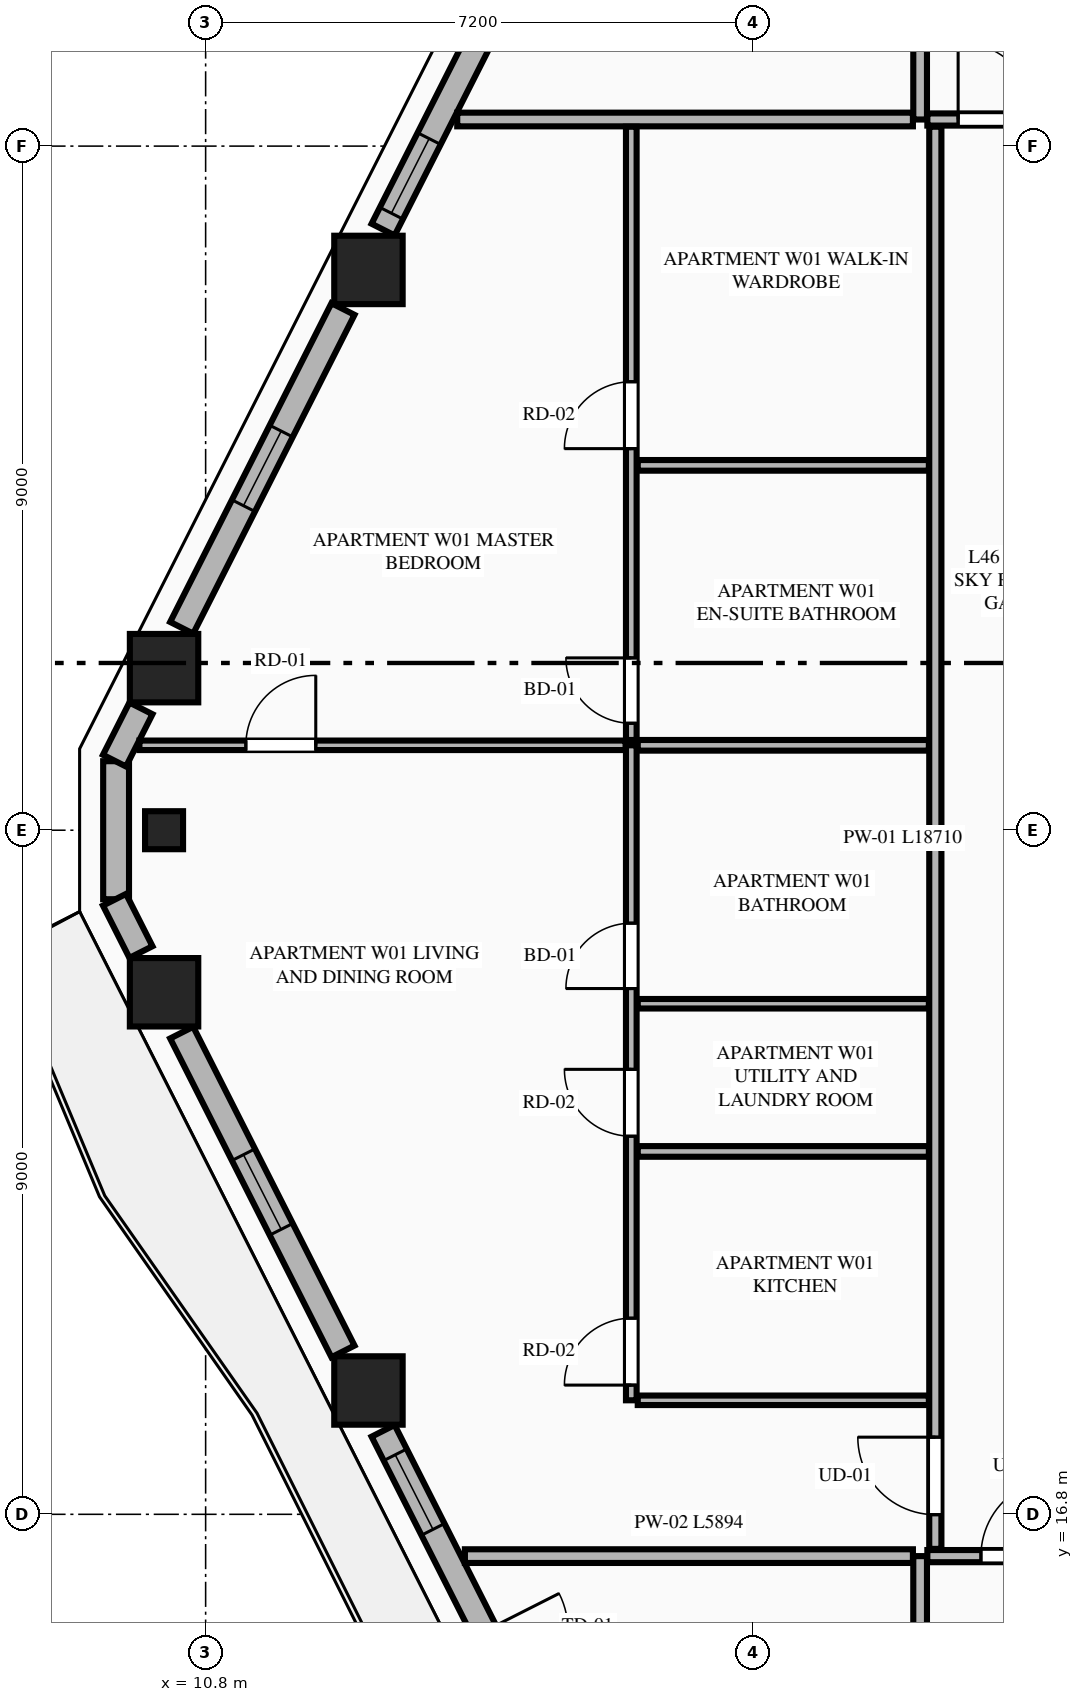
"""IFC4 building model, lengths in metres.
Left out: names, types, materials, properties, quantities, classifications, styles, units other than length and angle.
Written with IfcOpenShell. Run it as: python <this file> out.ifc"""

import sys

from ifc_helpers import new_model, si_unit, direction, frame, frame_2d, origin, origin_2d, place, context, subcontext, project, spatial, rectangle, extrude, element, fill, save


model = new_model("IFC4")
c1 = context("Model", 3, precision=1e-05, world=origin(), true_north=direction((0.0, 1.0)))
c2 = subcontext(c1, "Body", "Model", "MODEL_VIEW")
j1 = project(units=[si_unit("LENGTHUNIT", "METRE"), si_unit("PLANEANGLEUNIT", "RADIAN")], contexts=[c1])
p1 = place(None, origin())
s1 = spatial("IfcSite", under=j1, at=p1, CompositionType="ELEMENT")
p2 = place(p1, origin())
s2 = spatial("IfcBuilding", under=s1, at=p2, CompositionType="ELEMENT")
p3 = place(p2, frame((0.0, 0.0, 175.45)))
s3 = spatial("IfcBuildingStorey", under=s2, at=p3, CompositionType="ELEMENT", Elevation=175.45)
for number, where, z_axis, x_axis in (
    (1, (12.942, 33.171, 0.0), (0.0, 0.0, 1.0), (1.0, 0.0, 0.0)),
    (2, (10.253, 27.932, 0.0), (0.0, 0.0, 1.0), (1.0, 0.0, 0.0)),
    (3, (10.253, 23.668, 0.0), (0.0, 0.0, 1.0), (1.0, 0.0, 0.0)),
    (4, (12.942, 18.429, 0.0), (0.0, 0.0, 1.0), (1.0, 0.0, 0.0)),
):
    element("IfcColumn", number, at=place(p3, frame(where, z_axis=z_axis, x_axis=x_axis)), inside=s3, PredefinedType="COLUMN", context=c2, shape_type="SweptSolid", body=[
        extrude(rectangle(XDim=0.9, YDim=0.9, at=origin_2d()), origin(), (0.0, 0.0, 1.0), 3.55),
    ])
p4 = place(p3, frame((10.253, 25.8, 0.0), z_axis=(0.0, 0.0, 1.0), x_axis=(0.0, -1.0, 0.0)))
e5 = element("IfcColumn", 5, at=p4, inside=s3, PredefinedType="PILASTER", context=c2, shape_type="SweptSolid", body=[
    extrude(rectangle(XDim=0.5, YDim=0.35, at=origin_2d()), origin(), (0.0, 0.0, 1.0), 3.55),
])
p5 = place(p3, frame((9.622, 26.708, 0.0), z_axis=(0.0, 0.0, 1.0), x_axis=(0.0, -1.0, 0.0)))
e6 = element("IfcWall", 6, at=p5, inside=s3, PredefinedType="STANDARD", context=c2, shape_type="SweptSolid", body=[
    extrude(rectangle(XDim=1.816, YDim=0.34, at=frame_2d((0.908, 0.0))), origin(), (0.0, 0.0, 1.0), 3.35),
])
p6 = place(p3, frame((15.352, 38.083, 0.0), z_axis=(0.0, 0.0, 1.0), x_axis=(-0.451524246964, -0.89225884944, 0.0)))
e7 = element("IfcWall", 7, at=p6, inside=s3, PredefinedType="STANDARD", context=c2, shape_type="SweptSolid", body=[
    extrude(rectangle(XDim=4.91, YDim=0.34, at=frame_2d((2.455, 0.0))), origin(), (0.0, 0.0, 1.0), 2.883),
])
p7 = place(p6, frame((0.963, 0.0, 0.75)))
e8 = element("IfcOpeningElement", 8, at=p7, cuts=e7, PredefinedType="OPENING", context=c2, shape_type="SweptSolid", body=[
    extrude(rectangle(XDim=1.1, YDim=1.983, at=frame_2d((0.55, 0.991))), frame((0.0, 0.18, 0.0), z_axis=(0.0, -1.0, 0.0), x_axis=(1.0, 0.0, 0.0)), (0.0, 0.0, 1.0), 0.36),
])
p8 = place(p6, frame((3.569, 0.0, 0.75)))
e9 = element("IfcOpeningElement", 9, at=p8, cuts=e7, PredefinedType="OPENING", context=c2, shape_type="SweptSolid", body=[
    extrude(rectangle(XDim=1.1, YDim=1.983, at=frame_2d((0.55, 0.991))), frame((0.0, 0.18, 0.0), z_axis=(0.0, -1.0, 0.0), x_axis=(1.0, 0.0, 0.0)), (0.0, 0.0, 1.0), 0.36),
])
p9 = place(p3, frame((12.607, 32.657, 0.0), z_axis=(0.0, 0.0, 1.0), x_axis=(-0.451426298588, -0.892308409096, 0.0)))
e10 = element("IfcWall", 10, at=p9, inside=s3, PredefinedType="STANDARD", context=c2, shape_type="SweptSolid", body=[
    extrude(rectangle(XDim=4.7, YDim=0.34, at=frame_2d((2.35, 0.0))), origin(), (0.0, 0.0, 1.0), 2.883),
])
p10 = place(p9, frame((1.8, 0.0, 0.75)))
e11 = element("IfcOpeningElement", 11, at=p10, cuts=e10, PredefinedType="OPENING", context=c2, shape_type="SweptSolid", body=[
    extrude(rectangle(XDim=1.1, YDim=1.983, at=frame_2d((0.55, 0.991))), frame((0.0, 0.18, 0.0), z_axis=(0.0, -1.0, 0.0), x_axis=(1.0, 0.0, 0.0)), (0.0, 0.0, 1.0), 0.36),
])
for number, where, z_axis, x_axis in (
    (12, (9.949, 27.403, 0.0), (0.0, 0.0, 1.0), (-0.451, -0.892, 0.0)),
    (13, (9.601, 24.885, 0.0), (0.0, 0.0, 1.0), (0.451, -0.892, 0.0)),
):
    element("IfcWall", number, at=place(p3, frame(where, z_axis=z_axis, x_axis=x_axis)), inside=s3, PredefinedType="STANDARD", context=c2, shape_type="SweptSolid", body=[
        extrude(rectangle(XDim=0.771, YDim=0.34, at=frame_2d((0.385, 0.0))), origin(), (0.0, 0.0, 1.0), 3.35),
    ])
p11 = place(p3, frame((10.485, 23.137, 0.0), z_axis=(0.0, 0.0, 1.0), x_axis=(0.451447222193, -0.892297823361, 0.0)))
e14 = element("IfcWall", 14, at=p11, inside=s3, PredefinedType="STANDARD", context=c2, shape_type="SweptSolid", body=[
    extrude(rectangle(XDim=4.7, YDim=0.34, at=frame_2d((2.35, 0.0))), origin(), (0.0, 0.0, 1.0), 2.883),
])
p12 = place(p11, frame((1.8, 0.0, 0.75)))
e15 = element("IfcOpeningElement", 15, at=p12, cuts=e14, PredefinedType="OPENING", context=c2, shape_type="SweptSolid", body=[
    extrude(rectangle(XDim=1.1, YDim=1.983, at=frame_2d((0.55, 0.991))), frame((0.0, 0.18, 0.0), z_axis=(0.0, -1.0, 0.0), x_axis=(1.0, 0.0, 0.0)), (0.0, 0.0, 1.0), 0.36),
])
p13 = place(p3, frame((13.135, 17.898, 0.0), z_axis=(0.0, 0.0, 1.0), x_axis=(0.451544279509, -0.892248711763, 0.0)))
e16 = element("IfcWall", 16, at=p13, inside=s3, PredefinedType="STANDARD", context=c2, shape_type="SweptSolid", body=[
    extrude(rectangle(XDim=4.91, YDim=0.34, at=frame_2d((2.455, 0.0))), origin(), (0.0, 0.0, 1.0), 2.883),
])
p14 = place(p13, frame((2.954, 0.0, 0.0)))
e17 = element("IfcOpeningElement", 17, at=p14, cuts=e16, PredefinedType="OPENING", context=c2, shape_type="SweptSolid", body=[
    extrude(rectangle(XDim=1.1, YDim=2.25, at=frame_2d((0.55, 1.125))), frame((0.0, 0.18, 0.0), z_axis=(0.0, -1.0, 0.0), x_axis=(1.0, 0.0, 0.0)), (0.0, 0.0, 1.0), 0.36),
])
p15 = place(p13, frame((0.353, 0.0, 0.75)))
e18 = element("IfcOpeningElement", 18, at=p15, cuts=e16, PredefinedType="OPENING", context=c2, shape_type="SweptSolid", body=[
    extrude(rectangle(XDim=1.1, YDim=1.983, at=frame_2d((0.55, 0.991))), frame((0.0, 0.18, 0.0), z_axis=(0.0, -1.0, 0.0), x_axis=(1.0, 0.0, 0.0)), (0.0, 0.0, 1.0), 0.36),
])
p16 = place(p3, frame((20.2, 5.968, 0.0), z_axis=(0.0, 0.0, 1.0), x_axis=(0.0, 1.0, 0.0)))
e19 = element("IfcWall", 19, at=p16, inside=s3, PredefinedType="PARTITIONING", context=c2, shape_type="SweptSolid", body=[
    extrude(rectangle(XDim=10.282, YDim=0.18, at=frame_2d((5.141, 0.0))), origin(), (0.0, 0.0, 1.0), 3.35),
])
p17 = place(p3, frame((20.295, 16.25, 0.0), z_axis=(0.0, 0.0, 1.0), x_axis=(1.0, 0.0, 0.0)))
e20 = element("IfcWall", 20, at=p17, inside=s3, PredefinedType="PARTITIONING", context=c2, shape_type="SweptSolid", body=[
    extrude(rectangle(XDim=8.467, YDim=0.16, at=frame_2d((4.233, 0.0))), origin(), (0.0, 0.0, 1.0), 3.35),
])
p18 = place(p17, frame((0.705, 0.0, 0.0)))
e21 = element("IfcOpeningElement", 21, at=p18, cuts=e20, PredefinedType="OPENING", context=c2, shape_type="SweptSolid", body=[
    extrude(rectangle(XDim=1.02, YDim=2.25, at=frame_2d((0.51, 1.125))), frame((0.0, 0.09, 0.0), z_axis=(0.0, -1.0, 0.0), x_axis=(1.0, 0.0, 0.0)), (0.0, 0.0, 1.0), 0.18),
])
p19 = place(p3, frame((20.2, 35.15, 0.0), z_axis=(0.0, 0.0, 1.0), x_axis=(0.0, 1.0, 0.0)))
e22 = element("IfcWall", 22, at=p19, inside=s3, PredefinedType="PARTITIONING", context=c2, shape_type="SweptSolid", body=[
    extrude(rectangle(XDim=10.482, YDim=0.18, at=frame_2d((5.241, 0.0))), origin(), (0.0, 0.0, 1.0), 3.35),
])
p20 = place(p3, frame((20.295, 35.15, 0.0), z_axis=(0.0, 0.0, 1.0), x_axis=(1.0, 0.0, 0.0)))
e23 = element("IfcWall", 23, at=p20, inside=s3, PredefinedType="PARTITIONING", context=c2, shape_type="SweptSolid", body=[
    extrude(rectangle(XDim=15.553, YDim=0.16, at=frame_2d((7.776, 0.0))), origin(), (0.0, 0.0, 1.0), 3.35),
])
p21 = place(p20, frame((0.405, 0.0, 0.0)))
e24 = element("IfcOpeningElement", 24, at=p21, cuts=e23, PredefinedType="OPENING", context=c2, shape_type="SweptSolid", body=[
    extrude(rectangle(XDim=1.02, YDim=2.25, at=frame_2d((0.51, 1.125))), frame((0.0, 0.09, 0.0), z_axis=(0.0, -1.0, 0.0), x_axis=(1.0, 0.0, 0.0)), (0.0, 0.0, 1.0), 0.18),
])
p22 = place(p3, frame((14.211, 16.25, 0.0), z_axis=(0.0, 0.0, 1.0), x_axis=(1.0, 0.0, 0.0)))
e25 = element("IfcWall", 25, at=p22, inside=s3, PredefinedType="PARTITIONING", context=c2, shape_type="SweptSolid", body=[
    extrude(rectangle(XDim=5.894, YDim=0.18, at=frame_2d((2.947, 0.0))), origin(), (0.0, 0.0, 1.0), 3.35),
])
p23 = place(p3, frame((14.11, 35.15, 0.0), z_axis=(0.0, 0.0, 1.0), x_axis=(1.0, 0.0, 0.0)))
e26 = element("IfcWall", 26, at=p23, inside=s3, PredefinedType="PARTITIONING", context=c2, shape_type="SweptSolid", body=[
    extrude(rectangle(XDim=5.995, YDim=0.18, at=frame_2d((2.998, 0.0))), origin(), (0.0, 0.0, 1.0), 3.35),
])
p24 = place(p3, frame((20.4, 16.345, 0.0), z_axis=(0.0, 0.0, 1.0), x_axis=(0.0, 1.0, 0.0)))
e27 = element("IfcWall", 27, at=p24, inside=s3, PredefinedType="PARTITIONING", context=c2, shape_type="SweptSolid", body=[
    extrude(rectangle(XDim=18.71, YDim=0.16, at=frame_2d((9.355, 0.0))), origin(), (0.0, 0.0, 1.0), 3.35),
])
p25 = place(p24, frame((0.45, 0.0, 0.0)))
e28 = element("IfcOpeningElement", 28, at=p25, cuts=e27, PredefinedType="OPENING", context=c2, shape_type="SweptSolid", body=[
    extrude(rectangle(XDim=1.02, YDim=2.25, at=frame_2d((0.51, 1.125))), frame((0.0, 0.09, 0.0), z_axis=(0.0, -1.0, 0.0), x_axis=(1.0, 0.0, 0.0)), (0.0, 0.0, 1.0), 0.18),
])
p26 = place(p3, frame((16.485, 18.3, 0.0), z_axis=(0.0, 0.0, 1.0), x_axis=(1.0, 0.0, 0.0)))
e29 = element("IfcWall", 29, at=p26, inside=s3, PredefinedType="PARTITIONING", context=c2, shape_type="SweptSolid", body=[
    extrude(rectangle(XDim=3.83, YDim=0.125, at=frame_2d((1.915, 0.0))), origin(), (0.0, 0.0, 1.0), 2.807),
])
p27 = place(p3, frame((16.4, 18.3, 0.0), z_axis=(0.0, 0.0, 1.0), x_axis=(0.0, 1.0, 0.0)))
e30 = element("IfcWall", 30, at=p27, inside=s3, PredefinedType="PLUMBINGWALL", context=c2, shape_type="SweptSolid", body=[
    extrude(rectangle(XDim=8.617, YDim=0.14, at=frame_2d((4.309, 0.0))), origin(), (0.0, 0.0, 1.0), 3.35),
])
p28 = place(p27, frame((0.2, 0.0, 0.0)))
e31 = element("IfcOpeningElement", 31, at=p28, cuts=e30, PredefinedType="OPENING", context=c2, shape_type="SweptSolid", body=[
    extrude(rectangle(XDim=0.88, YDim=2.15, at=frame_2d((0.44, 1.075))), frame((0.0, 0.08, 0.0), z_axis=(0.0, -1.0, 0.0), x_axis=(1.0, 0.0, 0.0)), (0.0, 0.0, 1.0), 0.16),
])
p29 = place(p27, frame((3.474, 0.0, 0.0)))
e32 = element("IfcOpeningElement", 32, at=p29, cuts=e30, PredefinedType="OPENING", context=c2, shape_type="SweptSolid", body=[
    extrude(rectangle(XDim=0.88, YDim=2.15, at=frame_2d((0.44, 1.075))), frame((0.0, 0.08, 0.0), z_axis=(0.0, -1.0, 0.0), x_axis=(1.0, 0.0, 0.0)), (0.0, 0.0, 1.0), 0.16),
])
p30 = place(p27, frame((5.417, 0.0, 0.0)))
e33 = element("IfcOpeningElement", 33, at=p30, cuts=e30, PredefinedType="OPENING", context=c2, shape_type="SweptSolid", body=[
    extrude(rectangle(XDim=0.86, YDim=2.1, at=frame_2d((0.43, 1.05))), frame((0.0, 0.08, 0.0), z_axis=(0.0, -1.0, 0.0), x_axis=(1.0, 0.0, 0.0)), (0.0, 0.0, 1.0), 0.16),
])
p31 = place(p3, frame((16.4, 26.987, 0.0), z_axis=(0.0, 0.0, 1.0), x_axis=(0.0, 1.0, 0.0)))
e34 = element("IfcWall", 34, at=p31, inside=s3, PredefinedType="PLUMBINGWALL", context=c2, shape_type="SweptSolid", body=[
    extrude(rectangle(XDim=8.068, YDim=0.14, at=frame_2d((4.034, 0.0))), origin(), (0.0, 0.0, 1.0), 3.35),
])
p32 = place(p31, frame((0.22, 0.0, 0.0)))
e35 = element("IfcOpeningElement", 35, at=p32, cuts=e34, PredefinedType="OPENING", context=c2, shape_type="SweptSolid", body=[
    extrude(rectangle(XDim=0.86, YDim=2.1, at=frame_2d((0.43, 1.05))), frame((0.0, 0.08, 0.0), z_axis=(0.0, -1.0, 0.0), x_axis=(1.0, 0.0, 0.0)), (0.0, 0.0, 1.0), 0.16),
])
p33 = place(p31, frame((3.833, 0.0, 0.0)))
e36 = element("IfcOpeningElement", 36, at=p33, cuts=e34, PredefinedType="OPENING", context=c2, shape_type="SweptSolid", body=[
    extrude(rectangle(XDim=0.88, YDim=2.15, at=frame_2d((0.44, 1.075))), frame((0.0, 0.08, 0.0), z_axis=(0.0, -1.0, 0.0), x_axis=(1.0, 0.0, 0.0)), (0.0, 0.0, 1.0), 0.16),
])
p34 = place(p3, frame((16.485, 26.917, 0.0), z_axis=(0.0, 0.0, 1.0), x_axis=(1.0, 0.0, 0.0)))
e37 = element("IfcWall", 37, at=p34, inside=s3, PredefinedType="PLUMBINGWALL", context=c2, shape_type="SweptSolid", body=[
    extrude(rectangle(XDim=3.83, YDim=0.14, at=frame_2d((1.915, 0.0))), origin(), (0.0, 0.0, 1.0), 3.35),
])
p35 = place(p3, frame((9.929, 26.917, 0.0), z_axis=(0.0, 0.0, 1.0), x_axis=(1.0, 0.0, 0.0)))
e38 = element("IfcWall", 38, at=p35, inside=s3, PredefinedType="PARTITIONING", context=c2, shape_type="SweptSolid", body=[
    extrude(rectangle(XDim=6.396, YDim=0.125, at=frame_2d((3.198, 0.0))), origin(), (0.0, 0.0, 1.0), 3.35),
])
p36 = place(p35, frame((1.4, 0.0, 0.0)))
e39 = element("IfcOpeningElement", 39, at=p36, cuts=e38, PredefinedType="OPENING", context=c2, shape_type="SweptSolid", body=[
    extrude(rectangle(XDim=0.92, YDim=2.15, at=frame_2d((0.46, 1.075))), frame((0.0, 0.073, 0.0), z_axis=(0.0, -1.0, 0.0), x_axis=(1.0, 0.0, 0.0)), (0.0, 0.0, 1.0), 0.145),
])
p37 = place(p3, frame((16.485, 21.574, 0.0), z_axis=(0.0, 0.0, 1.0), x_axis=(1.0, 0.0, 0.0)))
e40 = element("IfcWall", 40, at=p37, inside=s3, PredefinedType="PLUMBINGWALL", context=c2, shape_type="SweptSolid", body=[
    extrude(rectangle(XDim=3.83, YDim=0.14, at=frame_2d((1.915, 0.0))), origin(), (0.0, 0.0, 1.0), 3.35),
])
p38 = place(p3, frame((16.485, 23.517, 0.0), z_axis=(0.0, 0.0, 1.0), x_axis=(1.0, 0.0, 0.0)))
e41 = element("IfcWall", 41, at=p38, inside=s3, PredefinedType="PARTITIONING", context=c2, shape_type="SweptSolid", body=[
    extrude(rectangle(XDim=3.83, YDim=0.125, at=frame_2d((1.915, 0.0))), origin(), (0.0, 0.0, 1.0), 3.35),
])
p39 = place(p3, frame((16.485, 30.6, 0.0), z_axis=(0.0, 0.0, 1.0), x_axis=(1.0, 0.0, 0.0)))
e42 = element("IfcWall", 42, at=p39, inside=s3, PredefinedType="PLUMBINGWALL", context=c2, shape_type="SweptSolid", body=[
    extrude(rectangle(XDim=3.83, YDim=0.14, at=frame_2d((1.915, 0.0))), origin(), (0.0, 0.0, 1.0), 3.35),
])
p40 = place(p10, origin())
e43 = element("IfcWindow", 43, at=p40, inside=s3, PartitioningType="SINGLE_PANEL", PredefinedType="WINDOW", context=c2, shape_type="SweptSolid", body=[
    extrude(rectangle(XDim=1.1, YDim=1.983, at=frame_2d((0.55, 0.991))), frame((0.0, 0.03, 0.0), z_axis=(0.0, -1.0, 0.0), x_axis=(1.0, 0.0, 0.0)), (0.0, 0.0, 1.0), 0.06),
])
fill(e11, e43)
p41 = place(p12, origin())
e44 = element("IfcWindow", 44, at=p41, inside=s3, PartitioningType="SINGLE_PANEL", PredefinedType="WINDOW", context=c2, shape_type="SweptSolid", body=[
    extrude(rectangle(XDim=1.1, YDim=1.983, at=frame_2d((0.55, 0.991))), frame((0.0, 0.03, 0.0), z_axis=(0.0, -1.0, 0.0), x_axis=(1.0, 0.0, 0.0)), (0.0, 0.0, 1.0), 0.06),
])
fill(e15, e44)
p42 = place(p18, origin())
e45 = element("IfcDoor", 45, at=p42, inside=s3, OperationType="SINGLE_SWING_RIGHT", PredefinedType="DOOR", context=c2, shape_type="SweptSolid", body=[
    extrude(rectangle(XDim=1.02, YDim=2.25, at=frame_2d((0.51, 1.125))), frame((0.0, 0.025, 0.0), z_axis=(0.0, -1.0, 0.0), x_axis=(1.0, 0.0, 0.0)), (0.0, 0.0, 1.0), 0.05),
])
fill(e21, e45)
p43 = place(p21, origin())
e46 = element("IfcDoor", 46, at=p43, inside=s3, OperationType="SINGLE_SWING_LEFT", PredefinedType="DOOR", context=c2, shape_type="SweptSolid", body=[
    extrude(rectangle(XDim=1.02, YDim=2.25, at=frame_2d((0.51, 1.125))), frame((0.0, 0.025, 0.0), z_axis=(0.0, -1.0, 0.0), x_axis=(1.0, 0.0, 0.0)), (0.0, 0.0, 1.0), 0.05),
])
fill(e24, e46)
p44 = place(p28, origin())
e47 = element("IfcDoor", 47, at=p44, inside=s3, OperationType="SINGLE_SWING_LEFT", PredefinedType="DOOR", context=c2, shape_type="SweptSolid", body=[
    extrude(rectangle(XDim=0.88, YDim=2.15, at=frame_2d((0.44, 1.075))), frame((0.0, 0.025, 0.0), z_axis=(0.0, -1.0, 0.0), x_axis=(1.0, 0.0, 0.0)), (0.0, 0.0, 1.0), 0.05),
])
fill(e31, e47)
p45 = place(p29, origin())
e48 = element("IfcDoor", 48, at=p45, inside=s3, OperationType="SINGLE_SWING_RIGHT", PredefinedType="DOOR", context=c2, shape_type="SweptSolid", body=[
    extrude(rectangle(XDim=0.88, YDim=2.15, at=frame_2d((0.44, 1.075))), frame((0.0, 0.025, 0.0), z_axis=(0.0, -1.0, 0.0), x_axis=(1.0, 0.0, 0.0)), (0.0, 0.0, 1.0), 0.05),
])
fill(e32, e48)
p46 = place(p30, origin())
e49 = element("IfcDoor", 49, at=p46, inside=s3, OperationType="SINGLE_SWING_LEFT", PredefinedType="DOOR", context=c2, shape_type="SweptSolid", body=[
    extrude(rectangle(XDim=0.86, YDim=2.1, at=frame_2d((0.43, 1.05))), frame((0.0, 0.025, 0.0), z_axis=(0.0, -1.0, 0.0), x_axis=(1.0, 0.0, 0.0)), (0.0, 0.0, 1.0), 0.05),
])
fill(e33, e49)
p47 = place(p32, origin())
e50 = element("IfcDoor", 50, at=p47, inside=s3, OperationType="SINGLE_SWING_RIGHT", PredefinedType="DOOR", context=c2, shape_type="SweptSolid", body=[
    extrude(rectangle(XDim=0.86, YDim=2.1, at=frame_2d((0.43, 1.05))), frame((0.0, 0.025, 0.0), z_axis=(0.0, -1.0, 0.0), x_axis=(1.0, 0.0, 0.0)), (0.0, 0.0, 1.0), 0.05),
])
fill(e35, e50)
p48 = place(p33, origin())
e51 = element("IfcDoor", 51, at=p48, inside=s3, OperationType="SINGLE_SWING_LEFT", PredefinedType="DOOR", context=c2, shape_type="SweptSolid", body=[
    extrude(rectangle(XDim=0.88, YDim=2.15, at=frame_2d((0.44, 1.075))), frame((0.0, 0.025, 0.0), z_axis=(0.0, -1.0, 0.0), x_axis=(1.0, 0.0, 0.0)), (0.0, 0.0, 1.0), 0.05),
])
fill(e36, e51)
p49 = place(p25, origin())
e52 = element("IfcDoor", 52, at=p49, inside=s3, OperationType="SINGLE_SWING_RIGHT", PredefinedType="DOOR", context=c2, shape_type="SweptSolid", body=[
    extrude(rectangle(XDim=1.02, YDim=2.25, at=frame_2d((0.51, 1.125))), frame((0.0, 0.025, 0.0), z_axis=(0.0, -1.0, 0.0), x_axis=(1.0, 0.0, 0.0)), (0.0, 0.0, 1.0), 0.05),
])
fill(e28, e52)
p50 = place(p36, origin())
e53 = element("IfcDoor", 53, at=p50, inside=s3, OperationType="SINGLE_SWING_RIGHT", PredefinedType="DOOR", context=c2, shape_type="SweptSolid", body=[
    extrude(rectangle(XDim=0.92, YDim=2.15, at=frame_2d((0.46, 1.075))), frame((0.0, 0.025, 0.0), z_axis=(0.0, -1.0, 0.0), x_axis=(1.0, 0.0, 0.0)), (0.0, 0.0, 1.0), 0.05),
])
fill(e39, e53)
p51 = place(p8, origin())
e54 = element("IfcWindow", 54, at=p51, inside=s3, PartitioningType="SINGLE_PANEL", PredefinedType="WINDOW", context=c2, shape_type="SweptSolid", body=[
    extrude(rectangle(XDim=1.1, YDim=1.983, at=frame_2d((0.55, 0.991))), frame((0.0, 0.03, 0.0), z_axis=(0.0, -1.0, 0.0), x_axis=(1.0, 0.0, 0.0)), (0.0, 0.0, 1.0), 0.06),
])
fill(e9, e54)
p52 = place(p15, origin())
e55 = element("IfcWindow", 55, at=p52, inside=s3, PartitioningType="SINGLE_PANEL", PredefinedType="WINDOW", context=c2, shape_type="SweptSolid", body=[
    extrude(rectangle(XDim=1.1, YDim=1.983, at=frame_2d((0.55, 0.991))), frame((0.0, 0.03, 0.0), z_axis=(0.0, -1.0, 0.0), x_axis=(1.0, 0.0, 0.0)), (0.0, 0.0, 1.0), 0.06),
])
fill(e18, e55)
save(model, sys.argv[1])
